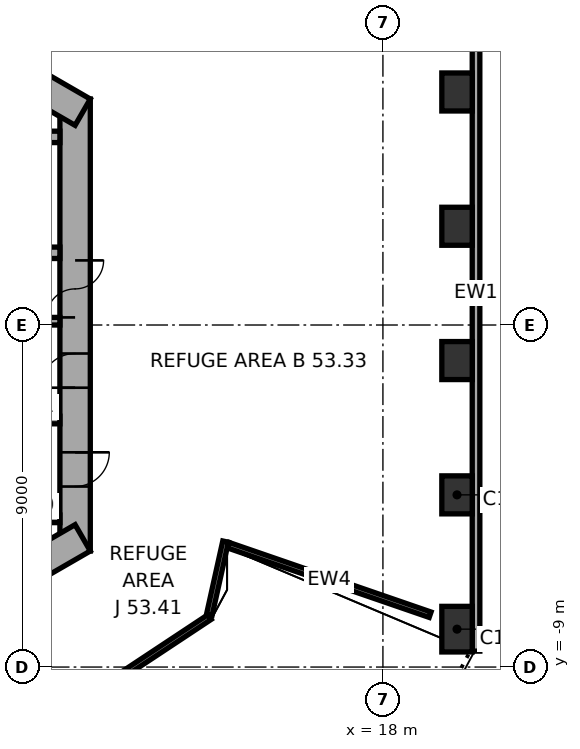
"""IFC4 building model, lengths in metres.
Left out: names, types, materials, properties, quantities, classifications, styles, units other than length and angle.
Written with IfcOpenShell. Run it as: python <this file> out.ifc"""

import sys

from ifc_helpers import new_model, si_unit, direction, frame, frame_2d, origin, origin_2d, place, context, subcontext, project, spatial, rectangle, extrude, element, fill, save


model = new_model("IFC4")
c1 = context("Model", 3, precision=1e-05, world=origin(), true_north=direction((0.0, 1.0)))
c2 = subcontext(c1, "Body", "Model", "MODEL_VIEW")
j1 = project(units=[si_unit("LENGTHUNIT", "METRE"), si_unit("PLANEANGLEUNIT", "RADIAN")], contexts=[c1])
p1 = place(None, origin())
s1 = spatial("IfcSite", under=j1, at=p1, CompositionType="ELEMENT")
p2 = place(p1, origin())
s2 = spatial("IfcBuilding", under=s1, at=p2, CompositionType="ELEMENT")
p3 = place(p2, frame((0.0, 0.0, 214.3)))
s3 = spatial("IfcBuildingStorey", under=s2, at=p3, CompositionType="ELEMENT", Elevation=214.3)
p4 = place(p3, frame((19.95, -8.003, 0.0), z_axis=(0.0, 0.0, 1.0), x_axis=(0.0, 1.0, 0.0)))
e1 = element("IfcColumn", 1, at=p4, inside=s3, PredefinedType="COLUMN", context=c2, shape_type="SweptSolid", body=[
    extrude(rectangle(XDim=1.2, YDim=0.8, at=origin_2d()), origin(), (0.0, 0.0, 1.0), 7.4),
])
for number, where, z_axis, x_axis in (
    (2, (19.95, -4.469, 0.0), (0.0, 0.0, 1.0), (0.0, 1.0, 0.0)),
    (3, (19.95, -0.936, 0.0), (0.0, 0.0, 1.0), (0.0, 1.0, 0.0)),
    (4, (19.95, 2.598, 0.0), (0.0, 0.0, 1.0), (0.0, 1.0, 0.0)),
    (5, (19.95, 6.132, 0.0), (0.0, 0.0, 1.0), (0.0, 1.0, 0.0)),
):
    element("IfcColumn", number, at=place(p3, frame(where, z_axis=z_axis, x_axis=x_axis)), inside=s3, PredefinedType="COLUMN", context=c2, shape_type="SweptSolid", body=[
        extrude(rectangle(XDim=1.0, YDim=0.8, at=origin_2d()), origin(), (0.0, 0.0, 1.0), 7.4),
    ])
p5 = place(p3, frame((9.9, -5.947, 0.0), z_axis=(0.0, 0.0, 1.0), x_axis=(0.0, 1.0, 0.0)))
e6 = element("IfcWall", 6, at=p5, inside=s3, PredefinedType="SHEAR", context=c2, shape_type="SweptSolid", body=[
    extrude(rectangle(XDim=11.894, YDim=0.8, at=frame_2d((5.947, 0.0))), origin(), (0.0, 0.0, 1.0), 7.4),
])
p6 = place(p5, frame((6.147, 0.0, 0.0)))
e7 = element("IfcOpeningElement", 7, at=p6, cuts=e6, PredefinedType="OPENING", context=c2, shape_type="SweptSolid", body=[
    extrude(rectangle(XDim=1.5, YDim=2.1, at=frame_2d((0.75, 1.05))), frame((0.0, 0.41, 0.0), z_axis=(0.0, -1.0, 0.0), x_axis=(1.0, 0.0, 0.0)), (0.0, 0.0, 1.0), 0.82),
])
p7 = place(p5, frame((1.697, 0.0, 0.0)))
e8 = element("IfcOpeningElement", 8, at=p7, cuts=e6, PredefinedType="OPENING", context=c2, shape_type="SweptSolid", body=[
    extrude(rectangle(XDim=0.9, YDim=2.1, at=frame_2d((0.45, 1.05))), frame((0.0, 0.41, 0.0), z_axis=(0.0, -1.0, 0.0), x_axis=(1.0, 0.0, 0.0)), (0.0, 0.0, 1.0), 0.82),
])
p8 = place(p5, frame((4.297, 0.0, 0.0)))
e9 = element("IfcOpeningElement", 9, at=p8, cuts=e6, PredefinedType="OPENING", context=c2, shape_type="SweptSolid", body=[
    extrude(rectangle(XDim=0.9, YDim=2.1, at=frame_2d((0.45, 1.05))), frame((0.0, 0.41, 0.0), z_axis=(0.0, -1.0, 0.0), x_axis=(1.0, 0.0, 0.0)), (0.0, 0.0, 1.0), 0.82),
])
p9 = place(p3, frame((10.1, 5.6, 0.0), z_axis=(0.0, 0.0, 1.0), x_axis=(-0.866023897231, 0.500002609418, 0.0)))
e10 = element("IfcWall", 10, at=p9, inside=s3, PredefinedType="SHEAR", context=c2, shape_type="SweptSolid", body=[
    extrude(rectangle(XDim=11.894, YDim=0.8, at=frame_2d((5.947, 0.0))), origin(), (0.0, 0.0, 1.0), 7.4),
])
p10 = place(p9, frame((2.947, 0.0, 0.0)))
e11 = element("IfcOpeningElement", 11, at=p10, cuts=e10, PredefinedType="OPENING", context=c2, shape_type="SweptSolid", body=[
    extrude(rectangle(XDim=0.9, YDim=2.1, at=frame_2d((0.45, 1.05))), frame((0.0, 0.41, 0.0), z_axis=(0.0, -1.0, 0.0), x_axis=(1.0, 0.0, 0.0)), (0.0, 0.0, 1.0), 0.82),
])
p11 = place(p9, frame((6.497, 0.0, 0.0)))
e12 = element("IfcOpeningElement", 12, at=p11, cuts=e10, PredefinedType="OPENING", context=c2, shape_type="SweptSolid", body=[
    extrude(rectangle(XDim=0.9, YDim=2.1, at=frame_2d((0.45, 1.05))), frame((0.0, 0.41, 0.0), z_axis=(0.0, -1.0, 0.0), x_axis=(1.0, 0.0, 0.0)), (0.0, 0.0, 1.0), 0.82),
])
p12 = place(p3, frame((-0.2, -11.547, 0.0), z_axis=(0.0, 0.0, 1.0), x_axis=(0.866023897231, 0.500002609418, 0.0)))
e13 = element("IfcWall", 13, at=p12, inside=s3, PredefinedType="SHEAR", context=c2, shape_type="SweptSolid", body=[
    extrude(rectangle(XDim=11.894, YDim=0.8, at=frame_2d((5.947, 0.0))), origin(), (0.0, 0.0, 1.0), 7.4),
])
p13 = place(p12, frame((2.497, 0.0, 0.0)))
e14 = element("IfcOpeningElement", 14, at=p13, cuts=e13, PredefinedType="OPENING", context=c2, shape_type="SweptSolid", body=[
    extrude(rectangle(XDim=1.1, YDim=2.1, at=frame_2d((0.55, 1.05))), frame((0.0, 0.41, 0.0), z_axis=(0.0, -1.0, 0.0), x_axis=(1.0, 0.0, 0.0)), (0.0, 0.0, 1.0), 0.82),
])
p14 = place(p12, frame((5.097, 0.0, 0.0)))
e15 = element("IfcOpeningElement", 15, at=p14, cuts=e13, PredefinedType="OPENING", context=c2, shape_type="SweptSolid", body=[
    extrude(rectangle(XDim=1.1, YDim=2.1, at=frame_2d((0.55, 1.05))), frame((0.0, 0.41, 0.0), z_axis=(0.0, -1.0, 0.0), x_axis=(1.0, 0.0, 0.0)), (0.0, 0.0, 1.0), 0.82),
])
p15 = place(p12, frame((7.697, 0.0, 0.0)))
e16 = element("IfcOpeningElement", 16, at=p15, cuts=e13, PredefinedType="OPENING", context=c2, shape_type="SweptSolid", body=[
    extrude(rectangle(XDim=1.1, YDim=2.1, at=frame_2d((0.55, 1.05))), frame((0.0, 0.41, 0.0), z_axis=(0.0, -1.0, 0.0), x_axis=(1.0, 0.0, 0.0)), (0.0, 0.0, 1.0), 0.82),
])
p16 = place(p3, frame((20.45, -8.581, 0.0), z_axis=(0.0, 0.0, 1.0), x_axis=(0.0, 1.0, 0.0)))
e17 = element("IfcWall", 17, at=p16, inside=s3, PredefinedType="STANDARD", context=c2, shape_type="SweptSolid", body=[
    extrude(rectangle(XDim=18.832, YDim=0.2, at=frame_2d((9.416, 0.0))), origin(), (0.0, 0.0, 1.0), 7.4),
])
p17 = place(p3, frame((19.242, -7.623, 0.0), z_axis=(0.0, 0.0, 1.0), x_axis=(-0.945463903204, 0.325726891334, 0.0)))
e18 = element("IfcWall", 18, at=p17, inside=s3, PredefinedType="STANDARD", context=c2, shape_type="SweptSolid", body=[
    extrude(rectangle(XDim=5.619, YDim=0.15, at=frame_2d((2.81, 0.0))), origin(), (0.0, 0.0, 1.0), 2.6),
])
p18 = place(p3, frame((13.859, -5.699, 0.0), z_axis=(0.0, 0.0, 1.0), x_axis=(-0.216825744963, -0.976210323814, 0.0)))
e19 = element("IfcWall", 19, at=p18, inside=s3, PredefinedType="STANDARD", context=c2, shape_type="SweptSolid", body=[
    extrude(rectangle(XDim=1.975, YDim=0.15, at=frame_2d((0.987, 0.0))), origin(), (0.0, 0.0, 1.0), 2.6),
])
p19 = place(p3, frame((13.44, -7.683, 0.0), z_axis=(0.0, 0.0, 1.0), x_axis=(-0.833878347594, -0.551948277844, 0.0)))
e20 = element("IfcWall", 20, at=p19, inside=s3, PredefinedType="STANDARD", context=c2, shape_type="SweptSolid", body=[
    extrude(rectangle(XDim=15.249, YDim=0.15, at=frame_2d((7.625, 0.0))), origin(), (0.0, 0.0, 1.0), 2.6),
])
p20 = place(p19, frame((2.912, 0.0, 0.0)))
e21 = element("IfcOpeningElement", 21, at=p20, cuts=e20, PredefinedType="OPENING", context=c2, shape_type="SweptSolid", body=[
    extrude(rectangle(XDim=1.8, YDim=2.4, at=frame_2d((0.9, 1.2))), frame((0.0, 0.085, 0.0), z_axis=(0.0, -1.0, 0.0), x_axis=(1.0, 0.0, 0.0)), (0.0, 0.0, 1.0), 0.17),
])
p21 = place(p19, frame((10.537, 0.0, 0.0)))
e22 = element("IfcOpeningElement", 22, at=p21, cuts=e20, PredefinedType="OPENING", context=c2, shape_type="SweptSolid", body=[
    extrude(rectangle(XDim=1.8, YDim=2.4, at=frame_2d((0.9, 1.2))), frame((0.0, 0.085, 0.0), z_axis=(0.0, -1.0, 0.0), x_axis=(1.0, 0.0, 0.0)), (0.0, 0.0, 1.0), 0.17),
])
for number, where, z_axis, x_axis in (
    (23, (7.3, -5.1, 0.0), (0.0, 0.0, 1.0), (1.0, 0.0, 0.0)),
    (24, (7.3, -2.5, 0.0), (0.0, 0.0, 1.0), (1.0, 0.0, 0.0)),
    (25, (7.3, 0.1, 0.0), (0.0, 0.0, 1.0), (1.0, 0.0, 0.0)),
):
    element("IfcWall", number, at=place(p3, frame(where, z_axis=z_axis, x_axis=x_axis)), inside=s3, PredefinedType="PARTITIONING", context=c2, shape_type="SweptSolid", body=[
        extrude(rectangle(XDim=2.2, YDim=0.2, at=frame_2d((1.1, 0.0))), origin(), (0.0, 0.0, 1.0), 7.12),
    ])
p22 = place(p3, frame((7.3, 1.9, 0.0), z_axis=(0.0, 0.0, 1.0), x_axis=(1.0, 0.0, 0.0)))
e26 = element("IfcWall", 26, at=p22, inside=s3, PredefinedType="SHEAR", context=c2, shape_type="SweptSolid", body=[
    extrude(rectangle(XDim=2.2, YDim=0.3, at=frame_2d((1.1, 0.0))), origin(), (0.0, 0.0, 1.0), 7.12),
])
p23 = place(p22, frame((0.7, 0.0, 0.0)))
e27 = element("IfcOpeningElement", 27, at=p23, cuts=e26, PredefinedType="OPENING", context=c2, shape_type="SweptSolid", body=[
    extrude(rectangle(XDim=1.1, YDim=2.1, at=frame_2d((0.55, 1.05))), frame((0.0, 0.16, 0.0), z_axis=(0.0, -1.0, 0.0), x_axis=(1.0, 0.0, 0.0)), (0.0, 0.0, 1.0), 0.32),
])
p24 = place(p3, frame((7.3, 4.95, 0.0), z_axis=(0.0, 0.0, 1.0), x_axis=(1.0, 0.0, 0.0)))
e28 = element("IfcWall", 28, at=p24, inside=s3, PredefinedType="SHEAR", context=c2, shape_type="SweptSolid", body=[
    extrude(rectangle(XDim=2.2, YDim=0.3, at=frame_2d((1.1, 0.0))), origin(), (0.0, 0.0, 1.0), 7.12),
])
p25 = place(p6, origin())
e29 = element("IfcDoor", 29, at=p25, inside=s3, OperationType="DOUBLE_DOOR_SINGLE_SWING", PredefinedType="DOOR", context=c2, shape_type="SweptSolid", body=[
    extrude(rectangle(XDim=1.5, YDim=2.1, at=frame_2d((0.75, 1.05))), frame((0.0, 0.025, 0.0), z_axis=(0.0, -1.0, 0.0), x_axis=(1.0, 0.0, 0.0)), (0.0, 0.0, 1.0), 0.05),
])
fill(e7, e29)
p26 = place(p7, origin())
e30 = element("IfcDoor", 30, at=p26, inside=s3, OperationType="SINGLE_SWING_LEFT", PredefinedType="DOOR", context=c2, shape_type="SweptSolid", body=[
    extrude(rectangle(XDim=0.9, YDim=2.1, at=frame_2d((0.45, 1.05))), frame((0.0, 0.025, 0.0), z_axis=(0.0, -1.0, 0.0), x_axis=(1.0, 0.0, 0.0)), (0.0, 0.0, 1.0), 0.05),
])
fill(e8, e30)
p27 = place(p8, origin())
e31 = element("IfcDoor", 31, at=p27, inside=s3, OperationType="SINGLE_SWING_LEFT", PredefinedType="DOOR", context=c2, shape_type="SweptSolid", body=[
    extrude(rectangle(XDim=0.9, YDim=2.1, at=frame_2d((0.45, 1.05))), frame((0.0, 0.025, 0.0), z_axis=(0.0, -1.0, 0.0), x_axis=(1.0, 0.0, 0.0)), (0.0, 0.0, 1.0), 0.05),
])
fill(e9, e31)
save(model, sys.argv[1])
